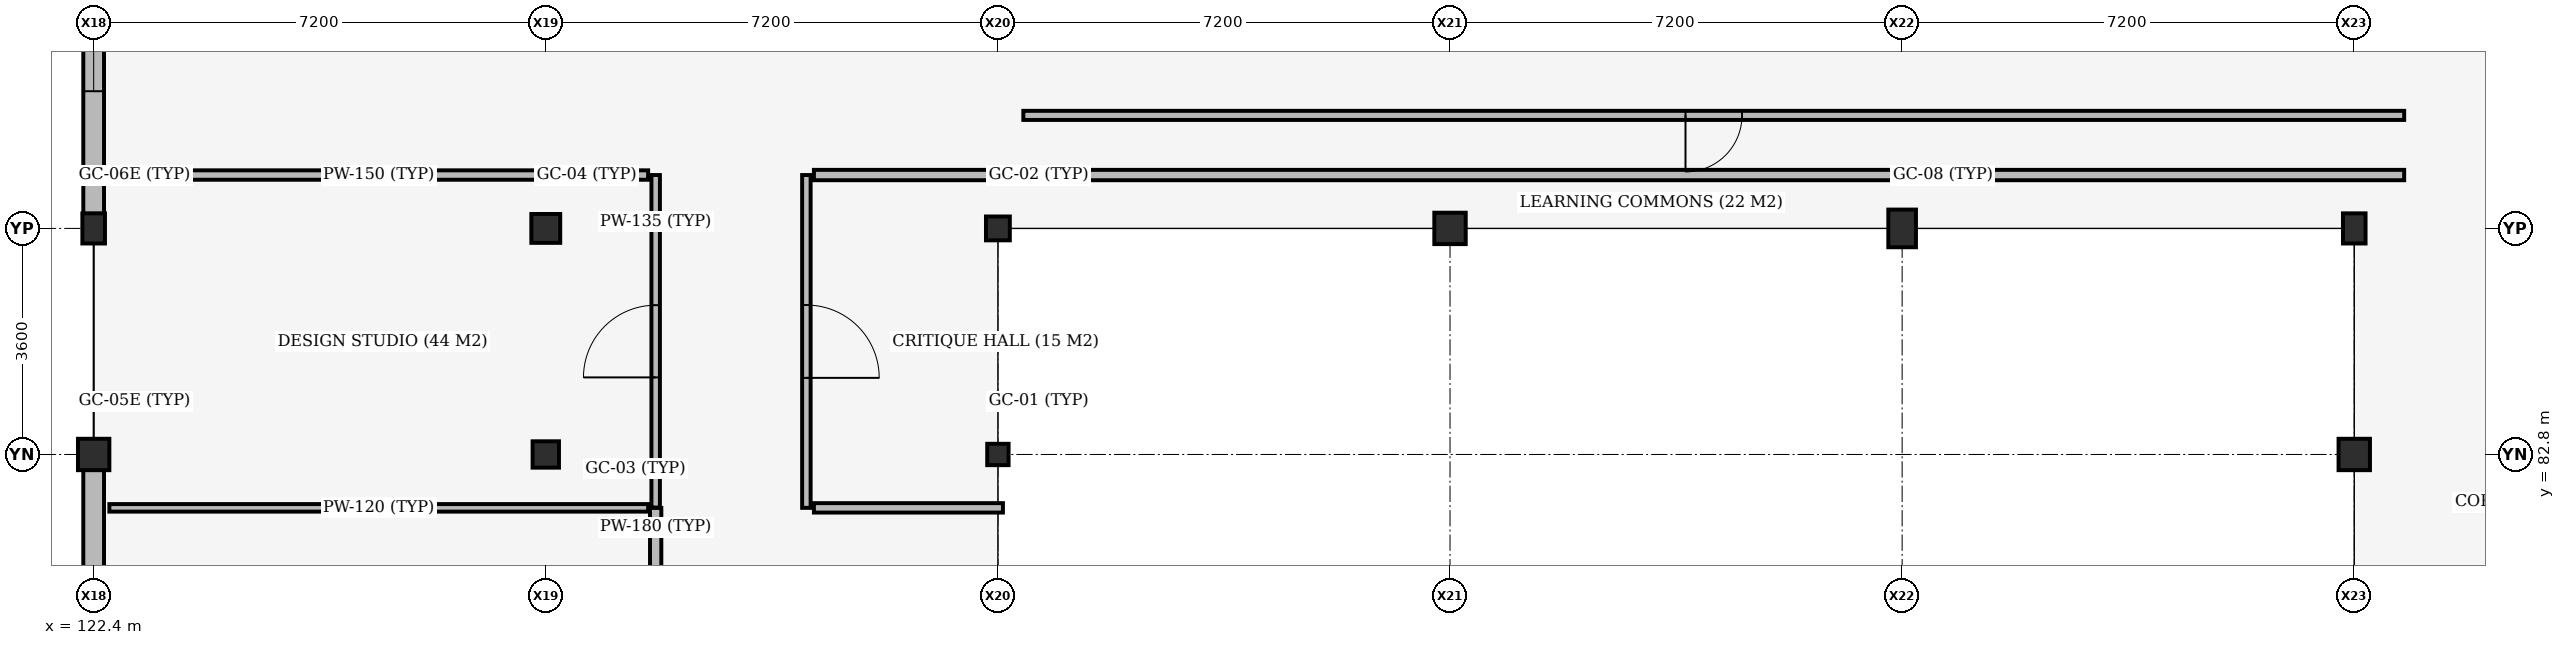
"""IFC4 building model, lengths in metres.
Left out: names, types, materials, properties, quantities, classifications, styles, units other than length and angle.
Written with IfcOpenShell. Run it as: python <this file> out.ifc"""

import sys

from ifc_helpers import new_model, si_unit, direction, frame, frame_2d, origin, origin_2d, place, context, subcontext, project, spatial, rectangle, extrude, element, fill, save


model = new_model("IFC4")
c1 = context("Model", 3, precision=1e-05, world=origin(), true_north=direction((0.0, 1.0)))
c2 = subcontext(c1, "Body", "Model", "MODEL_VIEW")
j1 = project(units=[si_unit("LENGTHUNIT", "METRE"), si_unit("PLANEANGLEUNIT", "RADIAN")], contexts=[c1])
p1 = place(None, origin())
s1 = spatial("IfcSite", under=j1, at=p1, CompositionType="ELEMENT")
p2 = place(p1, origin())
s2 = spatial("IfcBuilding", under=s1, at=p2, CompositionType="ELEMENT")
p3 = place(p2, frame((0.0, 0.0, 18.0)))
s3 = spatial("IfcBuildingStorey", under=s2, at=p3, CompositionType="ELEMENT", Elevation=18.0)
p4 = place(p3, frame((122.4, 82.8, 0.0), z_axis=(0.0, 0.0, 1.0), x_axis=(1.0, 0.0, 0.0)))
e1 = element("IfcColumn", 1, at=p4, inside=s3, PredefinedType="COLUMN", context=c2, shape_type="SweptSolid", body=[
    extrude(rectangle(XDim=0.5, YDim=0.5, at=origin_2d()), origin(), (0.0, 0.0, 1.0), 3.96),
])
p5 = place(p3, frame((122.4, 86.4, 0.0), z_axis=(0.0, 0.0, 1.0), x_axis=(1.0, 0.0, 0.0)))
e2 = element("IfcColumn", 2, at=p5, inside=s3, PredefinedType="COLUMN", context=c2, shape_type="SweptSolid", body=[
    extrude(rectangle(XDim=0.36, YDim=0.48, at=origin_2d()), origin(), (0.0, 0.0, 1.0), 3.96),
])
p6 = place(p3, frame((129.6, 82.8, 0.0), z_axis=(0.0, 0.0, 1.0), x_axis=(1.0, 0.0, 0.0)))
e3 = element("IfcColumn", 3, at=p6, inside=s3, PredefinedType="COLUMN", context=c2, shape_type="SweptSolid", body=[
    extrude(rectangle(XDim=0.42, YDim=0.42, at=origin_2d()), origin(), (0.0, 0.0, 1.0), 3.96),
])
p7 = place(p3, frame((129.6, 86.4, 0.0), z_axis=(0.0, 0.0, 1.0), x_axis=(1.0, 0.0, 0.0)))
e4 = element("IfcColumn", 4, at=p7, inside=s3, PredefinedType="COLUMN", context=c2, shape_type="SweptSolid", body=[
    extrude(rectangle(XDim=0.46, YDim=0.46, at=origin_2d()), origin(), (0.0, 0.0, 1.0), 3.96),
])
p8 = place(p3, frame((136.8, 82.8, 0.0), z_axis=(0.0, 0.0, 1.0), x_axis=(1.0, 0.0, 0.0)))
e5 = element("IfcColumn", 5, at=p8, inside=s3, PredefinedType="COLUMN", context=c2, shape_type="SweptSolid", body=[
    extrude(rectangle(XDim=0.34, YDim=0.34, at=origin_2d()), origin(), (0.0, 0.0, 1.0), 3.96),
])
p9 = place(p3, frame((136.8, 86.4, 0.0), z_axis=(0.0, 0.0, 1.0), x_axis=(1.0, 0.0, 0.0)))
e6 = element("IfcColumn", 6, at=p9, inside=s3, PredefinedType="COLUMN", context=c2, shape_type="SweptSolid", body=[
    extrude(rectangle(XDim=0.38, YDim=0.38, at=origin_2d()), origin(), (0.0, 0.0, 1.0), 3.96),
])
p10 = place(p3, frame((144.0, 86.4, 0.0), z_axis=(0.0, 0.0, 1.0), x_axis=(1.0, 0.0, 0.0)))
e7 = element("IfcColumn", 7, at=p10, inside=s3, PredefinedType="COLUMN", context=c2, shape_type="SweptSolid", body=[
    extrude(rectangle(XDim=0.5, YDim=0.5, at=origin_2d()), origin(), (0.0, 0.0, 1.0), 3.96),
])
p11 = place(p3, frame((151.2, 86.4, 0.0), z_axis=(0.0, 0.0, 1.0), x_axis=(1.0, 0.0, 0.0)))
e8 = element("IfcColumn", 8, at=p11, inside=s3, PredefinedType="COLUMN", context=c2, shape_type="SweptSolid", body=[
    extrude(rectangle(XDim=0.44, YDim=0.6, at=origin_2d()), origin(), (0.0, 0.0, 1.0), 3.96),
])
p12 = place(p3, frame((158.4, 82.8, 0.0), z_axis=(0.0, 0.0, 1.0), x_axis=(1.0, 0.0, 0.0)))
e9 = element("IfcColumn", 9, at=p12, inside=s3, PredefinedType="COLUMN", context=c2, shape_type="SweptSolid", body=[
    extrude(rectangle(XDim=0.5, YDim=0.5, at=origin_2d()), origin(), (0.0, 0.0, 1.0), 3.96),
])
p13 = place(p3, frame((158.4, 86.4, 0.0), z_axis=(0.0, 0.0, 1.0), x_axis=(1.0, 0.0, 0.0)))
e10 = element("IfcColumn", 10, at=p13, inside=s3, PredefinedType="COLUMN", context=c2, shape_type="SweptSolid", body=[
    extrude(rectangle(XDim=0.36, YDim=0.48, at=origin_2d()), origin(), (0.0, 0.0, 1.0), 3.96),
])
p14 = place(p3, frame((122.4, 75.822, 0.0), z_axis=(0.0, 0.0, 1.0), x_axis=(0.0, 1.0, 0.0)))
e11 = element("IfcWall", 11, at=p14, inside=s3, PredefinedType="STANDARD", context=c2, shape_type="SweptSolid", body=[
    extrude(rectangle(XDim=6.736, YDim=0.33, at=frame_2d((3.368, 0.0))), origin(), (0.0, 0.0, 1.0), 3.96),
])
p15 = place(p14, frame((2.068, 0.0, 0.85)))
e12 = element("IfcOpeningElement", 12, at=p15, cuts=e11, PredefinedType="OPENING", context=c2, shape_type="SweptSolid", body=[
    extrude(rectangle(XDim=2.6, YDim=2.4, at=frame_2d((1.3, 1.2))), frame((0.0, 0.175, 0.0), z_axis=(0.0, -1.0, 0.0), x_axis=(1.0, 0.0, 0.0)), (0.0, 0.0, 1.0), 0.35),
])
p16 = place(p3, frame((122.4, 86.632, 0.0), z_axis=(0.0, 0.0, 1.0), x_axis=(0.0, 1.0, 0.0)))
e13 = element("IfcWall", 13, at=p16, inside=s3, PredefinedType="STANDARD", context=c2, shape_type="SweptSolid", body=[
    extrude(rectangle(XDim=6.706, YDim=0.33, at=frame_2d((3.353, 0.0))), origin(), (0.0, 0.0, 1.0), 3.96),
])
p17 = place(p16, frame((1.953, 0.0, 0.85)))
e14 = element("IfcOpeningElement", 14, at=p17, cuts=e13, PredefinedType="OPENING", context=c2, shape_type="SweptSolid", body=[
    extrude(rectangle(XDim=2.8, YDim=2.4, at=frame_2d((1.4, 1.2))), frame((0.0, 0.175, 0.0), z_axis=(0.0, -1.0, 0.0), x_axis=(1.0, 0.0, 0.0)), (0.0, 0.0, 1.0), 0.35),
])
p18 = place(p3, frame((131.35, 77.538, 0.0), z_axis=(0.0, 0.0, 1.0), x_axis=(0.0, 1.0, 0.0)))
e15 = element("IfcWall", 15, at=p18, inside=s3, PredefinedType="PARTITIONING", context=c2, shape_type="SweptSolid", body=[
    extrude(rectangle(XDim=4.412, YDim=0.18, at=frame_2d((2.206, 0.0))), origin(), (0.0, 0.0, 1.0), 3.96),
])
p19 = place(p18, frame((1.586, 0.0, 0.0)))
e16 = element("IfcOpeningElement", 16, at=p19, cuts=e15, PredefinedType="OPENING", context=c2, shape_type="SweptSolid", body=[
    extrude(rectangle(XDim=1.24, YDim=2.25, at=frame_2d((0.62, 1.125))), frame((0.0, 0.1, 0.0), z_axis=(0.0, -1.0, 0.0), x_axis=(1.0, 0.0, 0.0)), (0.0, 0.0, 1.0), 0.2),
])
p20 = place(p3, frame((122.65, 81.95, 0.0), z_axis=(0.0, 0.0, 1.0), x_axis=(1.0, 0.0, 0.0)))
e17 = element("IfcWall", 17, at=p20, inside=s3, PredefinedType="PARTITIONING", context=c2, shape_type="SweptSolid", body=[
    extrude(rectangle(XDim=8.58, YDim=0.12, at=frame_2d((4.29, 0.0))), origin(), (0.0, 0.0, 1.0), 3.96),
])
p21 = place(p3, frame((131.35, 81.955, 0.0), z_axis=(0.0, 0.0, 1.0), x_axis=(0.0, 1.0, 0.0)))
e18 = element("IfcWall", 18, at=p21, inside=s3, PredefinedType="PARTITIONING", context=c2, shape_type="SweptSolid", body=[
    extrude(rectangle(XDim=5.295, YDim=0.135, at=frame_2d((2.647, 0.0))), origin(), (0.0, 0.0, 1.0), 3.96),
])
p22 = place(p21, frame((2.073, 0.0, 0.0)))
e19 = element("IfcOpeningElement", 19, at=p22, cuts=e18, PredefinedType="OPENING", context=c2, shape_type="SweptSolid", body=[
    extrude(rectangle(XDim=1.15, YDim=2.2, at=frame_2d((0.575, 1.1))), frame((0.0, 0.077, 0.0), z_axis=(0.0, -1.0, 0.0), x_axis=(1.0, 0.0, 0.0)), (0.0, 0.0, 1.0), 0.155),
])
p23 = place(p3, frame((122.65, 87.25, 0.0), z_axis=(0.0, 0.0, 1.0), x_axis=(1.0, 0.0, 0.0)))
e20 = element("IfcWall", 20, at=p23, inside=s3, PredefinedType="PARTITIONING", context=c2, shape_type="SweptSolid", body=[
    extrude(rectangle(XDim=8.58, YDim=0.15, at=frame_2d((4.29, 0.0))), origin(), (0.0, 0.0, 1.0), 3.96),
])
p24 = place(p3, frame((133.75, 81.95, 0.0), z_axis=(0.0, 0.0, 1.0), x_axis=(0.0, 1.0, 0.0)))
e21 = element("IfcWall", 21, at=p24, inside=s3, PredefinedType="PARTITIONING", context=c2, shape_type="SweptSolid", body=[
    extrude(rectangle(XDim=5.3, YDim=0.135, at=frame_2d((2.65, 0.0))), origin(), (0.0, 0.0, 1.0), 3.96),
])
p25 = place(p24, frame((2.07, 0.0, 0.0)))
e22 = element("IfcOpeningElement", 22, at=p25, cuts=e21, PredefinedType="OPENING", context=c2, shape_type="SweptSolid", body=[
    extrude(rectangle(XDim=1.16, YDim=2.2, at=frame_2d((0.58, 1.1))), frame((0.0, 0.077, 0.0), z_axis=(0.0, -1.0, 0.0), x_axis=(1.0, 0.0, 0.0)), (0.0, 0.0, 1.0), 0.155),
])
p26 = place(p3, frame((133.87, 81.95, 0.0), z_axis=(0.0, 0.0, 1.0), x_axis=(1.0, 0.0, 0.0)))
e23 = element("IfcWall", 23, at=p26, inside=s3, PredefinedType="PARTITIONING", context=c2, shape_type="SweptSolid", body=[
    extrude(rectangle(XDim=3.01, YDim=0.15, at=frame_2d((1.505, 0.0))), origin(), (0.0, 0.0, 1.0), 3.96),
])
p27 = place(p3, frame((133.87, 87.25, 0.0), z_axis=(0.0, 0.0, 1.0), x_axis=(1.0, 0.0, 0.0)))
e24 = element("IfcWall", 24, at=p27, inside=s3, PredefinedType="PARTITIONING", context=c2, shape_type="SweptSolid", body=[
    extrude(rectangle(XDim=3.01, YDim=0.165, at=frame_2d((1.505, 0.0))), origin(), (0.0, 0.0, 1.0), 3.96),
])
p28 = place(p3, frame((136.885, 87.25, 0.0), z_axis=(0.0, 0.0, 1.0), x_axis=(1.0, 0.0, 0.0)))
e25 = element("IfcWall", 25, at=p28, inside=s3, PredefinedType="PARTITIONING", context=c2, shape_type="SweptSolid", body=[
    extrude(rectangle(XDim=22.31, YDim=0.165, at=frame_2d((11.155, 0.0))), origin(), (0.0, 0.0, 1.0), 3.96),
])
p29 = place(p3, frame((137.205, 88.2, 0.0), z_axis=(0.0, 0.0, 1.0), x_axis=(1.0, 0.0, 0.0)))
e26 = element("IfcWall", 26, at=p29, inside=s3, PredefinedType="PLUMBINGWALL", context=c2, shape_type="SweptSolid", body=[
    extrude(rectangle(XDim=21.99, YDim=0.145, at=frame_2d((10.995, 0.0))), origin(), (0.0, 0.0, 1.0), 3.96),
])
p30 = place(p29, frame((10.545, 0.0, 0.0)))
e27 = element("IfcOpeningElement", 27, at=p30, cuts=e26, PredefinedType="OPENING", context=c2, shape_type="SweptSolid", body=[
    extrude(rectangle(XDim=0.9, YDim=2.1, at=frame_2d((0.45, 1.05))), frame((0.0, 0.083, 0.0), z_axis=(0.0, -1.0, 0.0), x_axis=(1.0, 0.0, 0.0)), (0.0, 0.0, 1.0), 0.165),
])
p31 = place(p17, origin())
e28 = element("IfcWindow", 28, at=p31, inside=s3, PartitioningType="DOUBLE_PANEL_VERTICAL", PredefinedType="WINDOW", context=c2, shape_type="SweptSolid", body=[
    extrude(rectangle(XDim=2.8, YDim=2.4, at=frame_2d((1.4, 1.2))), frame((0.0, 0.03, 0.0), z_axis=(0.0, -1.0, 0.0), x_axis=(1.0, 0.0, 0.0)), (0.0, 0.0, 1.0), 0.06),
])
fill(e14, e28)
p32 = place(p22, origin())
e29 = element("IfcDoor", 29, at=p32, inside=s3, OperationType="SINGLE_SWING_LEFT", PredefinedType="DOOR", context=c2, shape_type="SweptSolid", body=[
    extrude(rectangle(XDim=1.15, YDim=2.2, at=frame_2d((0.575, 1.1))), frame((0.0, 0.025, 0.0), z_axis=(0.0, -1.0, 0.0), x_axis=(1.0, 0.0, 0.0)), (0.0, 0.0, 1.0), 0.05),
])
fill(e19, e29)
p33 = place(p25, origin())
e30 = element("IfcDoor", 30, at=p33, inside=s3, OperationType="SINGLE_SWING_RIGHT", PredefinedType="DOOR", context=c2, shape_type="SweptSolid", body=[
    extrude(rectangle(XDim=1.16, YDim=2.2, at=frame_2d((0.58, 1.1))), frame((0.0, 0.025, 0.0), z_axis=(0.0, -1.0, 0.0), x_axis=(1.0, 0.0, 0.0)), (0.0, 0.0, 1.0), 0.05),
])
fill(e22, e30)
p34 = place(p30, origin())
e31 = element("IfcDoor", 31, at=p34, inside=s3, OperationType="SINGLE_SWING_RIGHT", PredefinedType="DOOR", context=c2, shape_type="SweptSolid", body=[
    extrude(rectangle(XDim=0.9, YDim=2.1, at=frame_2d((0.45, 1.05))), frame((0.0, 0.025, 0.0), z_axis=(0.0, -1.0, 0.0), x_axis=(1.0, 0.0, 0.0)), (0.0, 0.0, 1.0), 0.05),
])
fill(e27, e31)
save(model, sys.argv[1])
